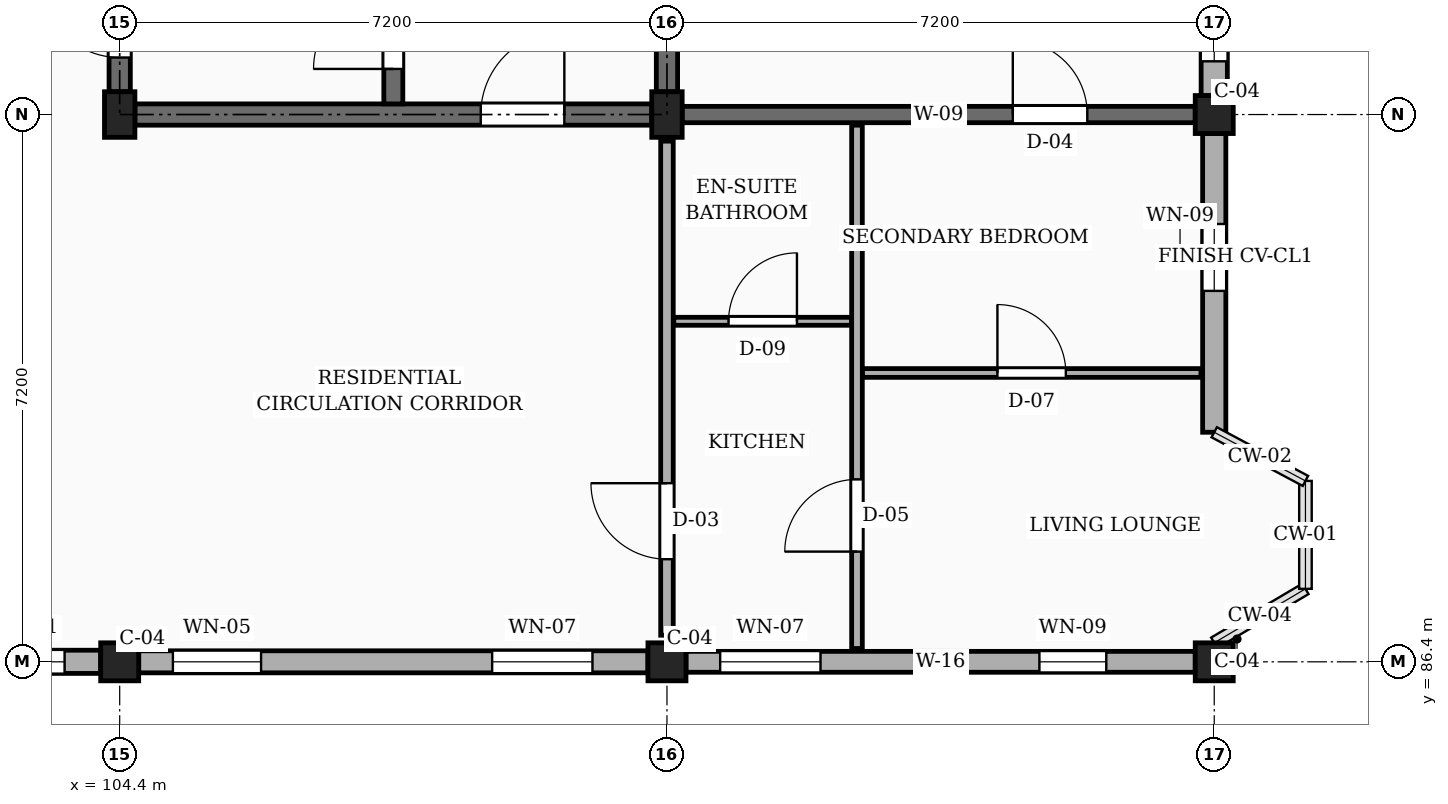
"""IFC4 building model, lengths in metres.
Left out: names, types, materials, properties, quantities, classifications, styles, units other than length and angle.
Written with IfcOpenShell. Run it as: python <this file> out.ifc"""

import sys

from ifc_helpers import new_model, si_unit, direction, frame, frame_2d, origin, origin_2d, place, context, subcontext, project, spatial, rectangle, extrude, element, fill, save


model = new_model("IFC4")
c1 = context("Model", 3, precision=1e-05, world=origin(), true_north=direction((0.0, 1.0)))
c2 = subcontext(c1, "Body", "Model", "MODEL_VIEW")
j1 = project(units=[si_unit("LENGTHUNIT", "METRE"), si_unit("PLANEANGLEUNIT", "RADIAN")], contexts=[c1])
p1 = place(None, origin())
s1 = spatial("IfcSite", under=j1, at=p1, CompositionType="ELEMENT")
p2 = place(p1, origin())
s2 = spatial("IfcBuilding", under=s1, at=p2, CompositionType="ELEMENT")
p3 = place(p2, frame((0.0, 0.0, 29.7)))
s3 = spatial("IfcBuildingStorey", under=s2, at=p3, CompositionType="ELEMENT", Elevation=29.7)
p4 = place(p3, frame((104.4, 86.4, 0.0), z_axis=(0.0, 0.0, 1.0), x_axis=(1.0, 0.0, 0.0)))
e1 = element("IfcColumn", 1, at=p4, inside=s3, PredefinedType="COLUMN", context=c2, shape_type="SweptSolid", body=[
    extrude(rectangle(XDim=0.5, YDim=0.5, at=origin_2d()), origin(), (0.0, 0.0, 1.0), 3.15),
])
p5 = place(p3, frame((104.4, 93.6, 0.0), z_axis=(0.0, 0.0, 1.0), x_axis=(1.0, 0.0, 0.0)))
e2 = element("IfcColumn", 2, at=p5, inside=s3, PredefinedType="COLUMN", context=c2, shape_type="SweptSolid", body=[
    extrude(rectangle(XDim=0.4, YDim=0.6, at=origin_2d()), origin(), (0.0, 0.0, 1.0), 3.15),
])
p6 = place(p3, frame((111.6, 86.4, 0.0), z_axis=(0.0, 0.0, 1.0), x_axis=(1.0, 0.0, 0.0)))
e3 = element("IfcColumn", 3, at=p6, inside=s3, PredefinedType="COLUMN", context=c2, shape_type="SweptSolid", body=[
    extrude(rectangle(XDim=0.5, YDim=0.5, at=origin_2d()), origin(), (0.0, 0.0, 1.0), 3.15),
])
p7 = place(p3, frame((111.6, 93.6, 0.0), z_axis=(0.0, 0.0, 1.0), x_axis=(1.0, 0.0, 0.0)))
e4 = element("IfcColumn", 4, at=p7, inside=s3, PredefinedType="COLUMN", context=c2, shape_type="SweptSolid", body=[
    extrude(rectangle(XDim=0.4, YDim=0.6, at=origin_2d()), origin(), (0.0, 0.0, 1.0), 3.15),
])
for number, where, z_axis, x_axis in (
    (5, (118.8, 86.4, 0.0), (0.0, 0.0, 1.0), (1.0, 0.0, 0.0)),
    (6, (118.8, 93.6, 0.0), (0.0, 0.0, 1.0), (1.0, 0.0, 0.0)),
):
    element("IfcColumn", number, at=place(p3, frame(where, z_axis=z_axis, x_axis=x_axis)), inside=s3, PredefinedType="COLUMN", context=c2, shape_type="SweptSolid", body=[
        extrude(rectangle(XDim=0.5, YDim=0.5, at=origin_2d()), origin(), (0.0, 0.0, 1.0), 3.15),
    ])
p8 = place(p3, frame((111.8, 93.6, 0.0), z_axis=(0.0, 0.0, 1.0), x_axis=(1.0, 0.0, 0.0)))
e7 = element("IfcWall", 7, at=p8, inside=s3, PredefinedType="SOLIDWALL", context=c2, shape_type="SweptSolid", body=[
    extrude(rectangle(XDim=6.75, YDim=0.215, at=frame_2d((3.375, 0.0))), origin(), (0.0, 0.0, 1.0), 2.19),
])
p9 = place(p8, frame((4.35, 0.0, 0.0)))
e8 = element("IfcOpeningElement", 8, at=p9, cuts=e7, PredefinedType="OPENING", context=c2, shape_type="SweptSolid", body=[
    extrude(rectangle(XDim=0.98, YDim=2.12, at=frame_2d((0.49, 1.06))), frame((0.0, 0.118, 0.0), z_axis=(0.0, -1.0, 0.0), x_axis=(1.0, 0.0, 0.0)), (0.0, 0.0, 1.0), 0.235),
])
p10 = place(p3, frame((97.45, 86.4, 0.0), z_axis=(0.0, 0.0, 1.0), x_axis=(1.0, 0.0, 0.0)))
e9 = element("IfcWall", 9, at=p10, inside=s3, PredefinedType="SOLIDWALL", context=c2, shape_type="SweptSolid", body=[
    extrude(rectangle(XDim=6.7, YDim=0.305, at=frame_2d((3.35, 0.0))), origin(), (0.0, 0.0, 1.0), 2.46),
])
p11 = place(p10, frame((1.045, 0.0, 0.78)))
e10 = element("IfcOpeningElement", 10, at=p11, cuts=e9, PredefinedType="OPENING", context=c2, shape_type="SweptSolid", body=[
    extrude(rectangle(XDim=0.92, YDim=1.15, at=frame_2d((0.46, 0.575))), frame((0.0, 0.163, 0.0), z_axis=(0.0, -1.0, 0.0), x_axis=(1.0, 0.0, 0.0)), (0.0, 0.0, 1.0), 0.325),
])
p12 = place(p10, frame((3.32, 0.0, 0.78)))
e11 = element("IfcOpeningElement", 11, at=p12, cuts=e9, PredefinedType="OPENING", context=c2, shape_type="SweptSolid", body=[
    extrude(rectangle(XDim=1.08, YDim=1.15, at=frame_2d((0.54, 0.575))), frame((0.0, 0.163, 0.0), z_axis=(0.0, -1.0, 0.0), x_axis=(1.0, 0.0, 0.0)), (0.0, 0.0, 1.0), 0.325),
])
p13 = place(p10, frame((5.185, 0.0, 0.78)))
e12 = element("IfcOpeningElement", 12, at=p13, cuts=e9, PredefinedType="OPENING", context=c2, shape_type="SweptSolid", body=[
    extrude(rectangle(XDim=1.04, YDim=1.26, at=frame_2d((0.52, 0.63))), frame((0.0, 0.163, 0.0), z_axis=(0.0, -1.0, 0.0), x_axis=(1.0, 0.0, 0.0)), (0.0, 0.0, 1.0), 0.325),
])
p14 = place(p3, frame((104.65, 86.4, 0.0), z_axis=(0.0, 0.0, 1.0), x_axis=(1.0, 0.0, 0.0)))
e13 = element("IfcWall", 13, at=p14, inside=s3, PredefinedType="SOLIDWALL", context=c2, shape_type="SweptSolid", body=[
    extrude(rectangle(XDim=6.7, YDim=0.29, at=frame_2d((3.35, 0.0))), origin(), (0.0, 0.0, 1.0), 2.46),
])
p15 = place(p14, frame((0.45, 0.0, 0.78)))
e14 = element("IfcOpeningElement", 14, at=p15, cuts=e13, PredefinedType="OPENING", context=c2, shape_type="SweptSolid", body=[
    extrude(rectangle(XDim=1.16, YDim=1.15, at=frame_2d((0.58, 0.575))), frame((0.0, 0.155, 0.0), z_axis=(0.0, -1.0, 0.0), x_axis=(1.0, 0.0, 0.0)), (0.0, 0.0, 1.0), 0.31),
])
p16 = place(p14, frame((4.65, 0.0, 0.78)))
e15 = element("IfcOpeningElement", 15, at=p16, cuts=e13, PredefinedType="OPENING", context=c2, shape_type="SweptSolid", body=[
    extrude(rectangle(XDim=1.32, YDim=1.15, at=frame_2d((0.66, 0.575))), frame((0.0, 0.155, 0.0), z_axis=(0.0, -1.0, 0.0), x_axis=(1.0, 0.0, 0.0)), (0.0, 0.0, 1.0), 0.31),
])
p17 = place(p3, frame((111.85, 86.4, 0.0), z_axis=(0.0, 0.0, 1.0), x_axis=(1.0, 0.0, 0.0)))
e16 = element("IfcWall", 16, at=p17, inside=s3, PredefinedType="SOLIDWALL", context=c2, shape_type="SweptSolid", body=[
    extrude(rectangle(XDim=6.7, YDim=0.275, at=frame_2d((3.35, 0.0))), origin(), (0.0, 0.0, 1.0), 2.46),
])
p18 = place(p17, frame((0.45, 0.0, 0.78)))
e17 = element("IfcOpeningElement", 17, at=p18, cuts=e16, PredefinedType="OPENING", context=c2, shape_type="SweptSolid", body=[
    extrude(rectangle(XDim=1.32, YDim=1.15, at=frame_2d((0.66, 0.575))), frame((0.0, 0.147, 0.0), z_axis=(0.0, -1.0, 0.0), x_axis=(1.0, 0.0, 0.0)), (0.0, 0.0, 1.0), 0.295),
])
p19 = place(p17, frame((4.65, 0.0, 0.78)))
e18 = element("IfcOpeningElement", 18, at=p19, cuts=e16, PredefinedType="OPENING", context=c2, shape_type="SweptSolid", body=[
    extrude(rectangle(XDim=0.88, YDim=1.26, at=frame_2d((0.44, 0.63))), frame((0.0, 0.147, 0.0), z_axis=(0.0, -1.0, 0.0), x_axis=(1.0, 0.0, 0.0)), (0.0, 0.0, 1.0), 0.295),
])
p20 = place(p3, frame((118.8, 89.42, 0.0), z_axis=(0.0, 0.0, 1.0), x_axis=(0.0, 1.0, 0.0)))
e19 = element("IfcWall", 19, at=p20, inside=s3, PredefinedType="SOLIDWALL", context=c2, shape_type="SweptSolid", body=[
    extrude(rectangle(XDim=3.93, YDim=0.305, at=frame_2d((1.965, 0.0))), origin(), (0.0, 0.0, 1.0), 2.46),
])
p21 = place(p20, frame((1.86, 0.0, 0.78)))
e20 = element("IfcOpeningElement", 20, at=p21, cuts=e19, PredefinedType="OPENING", context=c2, shape_type="SweptSolid", body=[
    extrude(rectangle(XDim=0.88, YDim=1.26, at=frame_2d((0.44, 0.63))), frame((0.0, 0.163, 0.0), z_axis=(0.0, -1.0, 0.0), x_axis=(1.0, 0.0, 0.0)), (0.0, 0.0, 1.0), 0.325),
])
p22 = place(p3, frame((118.8, 93.85, 0.0), z_axis=(0.0, 0.0, 1.0), x_axis=(0.0, 1.0, 0.0)))
e21 = element("IfcWall", 21, at=p22, inside=s3, PredefinedType="SOLIDWALL", context=c2, shape_type="SweptSolid", body=[
    extrude(rectangle(XDim=6.7, YDim=0.345, at=frame_2d((3.35, 0.0))), origin(), (0.0, 0.0, 1.0), 2.46),
])
p23 = place(p22, frame((0.45, 0.0, 0.78)))
e22 = element("IfcOpeningElement", 22, at=p23, cuts=e21, PredefinedType="OPENING", context=c2, shape_type="SweptSolid", body=[
    extrude(rectangle(XDim=0.96, YDim=1.26, at=frame_2d((0.48, 0.63))), frame((0.0, 0.183, 0.0), z_axis=(0.0, -1.0, 0.0), x_axis=(1.0, 0.0, 0.0)), (0.0, 0.0, 1.0), 0.365),
])
p24 = place(p22, frame((4.65, 0.0, 0.78)))
e23 = element("IfcOpeningElement", 23, at=p24, cuts=e21, PredefinedType="OPENING", context=c2, shape_type="SweptSolid", body=[
    extrude(rectangle(XDim=1.12, YDim=1.26, at=frame_2d((0.56, 0.63))), frame((0.0, 0.183, 0.0), z_axis=(0.0, -1.0, 0.0), x_axis=(1.0, 0.0, 0.0)), (0.0, 0.0, 1.0), 0.365),
])
p25 = place(p3, frame((104.4, 93.9, 0.0), z_axis=(0.0, 0.0, 1.0), x_axis=(0.0, 1.0, 0.0)))
e24 = element("IfcWall", 24, at=p25, inside=s3, PredefinedType="SHEAR", context=c2, shape_type="SweptSolid", body=[
    extrude(rectangle(XDim=6.6, YDim=0.28, at=frame_2d((3.3, 0.0))), origin(), (0.0, 0.0, 1.0), 2.89),
])
p26 = place(p25, frame((0.45, 0.0, 0.0)))
e25 = element("IfcOpeningElement", 25, at=p26, cuts=e24, PredefinedType="OPENING", context=c2, shape_type="SweptSolid", body=[
    extrude(rectangle(XDim=1.05, YDim=2.15, at=frame_2d((0.525, 1.075))), frame((0.0, 0.15, 0.0), z_axis=(0.0, -1.0, 0.0), x_axis=(1.0, 0.0, 0.0)), (0.0, 0.0, 1.0), 0.3),
])
p27 = place(p3, frame((111.6, 93.9, 0.0), z_axis=(0.0, 0.0, 1.0), x_axis=(0.0, 1.0, 0.0)))
e26 = element("IfcWall", 26, at=p27, inside=s3, PredefinedType="SHEAR", context=c2, shape_type="SweptSolid", body=[
    extrude(rectangle(XDim=6.6, YDim=0.28, at=frame_2d((3.3, 0.0))), origin(), (0.0, 0.0, 1.0), 2.89),
])
p28 = place(p3, frame((104.6, 93.6, 0.0), z_axis=(0.0, 0.0, 1.0), x_axis=(1.0, 0.0, 0.0)))
e27 = element("IfcWall", 27, at=p28, inside=s3, PredefinedType="SHEAR", context=c2, shape_type="SweptSolid", body=[
    extrude(rectangle(XDim=6.8, YDim=0.28, at=frame_2d((3.4, 0.0))), origin(), (0.0, 0.0, 1.0), 2.89),
])
p29 = place(p28, frame((4.55, 0.0, 0.0)))
e28 = element("IfcOpeningElement", 28, at=p29, cuts=e27, PredefinedType="OPENING", context=c2, shape_type="SweptSolid", body=[
    extrude(rectangle(XDim=1.1, YDim=2.15, at=frame_2d((0.55, 1.075))), frame((0.0, 0.15, 0.0), z_axis=(0.0, -1.0, 0.0), x_axis=(1.0, 0.0, 0.0)), (0.0, 0.0, 1.0), 0.3),
])
p30 = place(p3, frame((108.0, 93.74, 0.0), z_axis=(0.0, 0.0, 1.0), x_axis=(0.0, 1.0, 0.0)))
e29 = element("IfcWall", 29, at=p30, inside=s3, PredefinedType="SHEAR", context=c2, shape_type="SweptSolid", body=[
    extrude(rectangle(XDim=6.92, YDim=0.25, at=frame_2d((3.46, 0.0))), origin(), (0.0, 0.0, 1.0), 2.89),
])
p31 = place(p30, frame((0.46, 0.0, 0.0)))
e30 = element("IfcOpeningElement", 30, at=p31, cuts=e29, PredefinedType="OPENING", context=c2, shape_type="SweptSolid", body=[
    extrude(rectangle(XDim=1.05, YDim=2.15, at=frame_2d((0.525, 1.075))), frame((0.0, 0.135, 0.0), z_axis=(0.0, -1.0, 0.0), x_axis=(1.0, 0.0, 0.0)), (0.0, 0.0, 1.0), 0.27),
])
p32 = place(p3, frame((111.6, 86.75, 0.0), z_axis=(0.0, 0.0, 1.0), x_axis=(0.0, 1.0, 0.0)))
e31 = element("IfcWall", 31, at=p32, inside=s3, PredefinedType="PARTITIONING", context=c2, shape_type="SweptSolid", body=[
    extrude(rectangle(XDim=6.5, YDim=0.165, at=frame_2d((3.25, 0.0))), origin(), (0.0, 0.0, 1.0), 2.325),
])
p33 = place(p32, frame((1.0, 0.0, 0.0)))
e32 = element("IfcOpeningElement", 32, at=p33, cuts=e31, PredefinedType="OPENING", context=c2, shape_type="SweptSolid", body=[
    extrude(rectangle(XDim=1.0, YDim=2.15, at=frame_2d((0.5, 1.075))), frame((0.0, 0.093, 0.0), z_axis=(0.0, -1.0, 0.0), x_axis=(1.0, 0.0, 0.0)), (0.0, 0.0, 1.0), 0.185),
])
p34 = place(p3, frame((114.17, 90.2, 0.0), z_axis=(0.0, 0.0, 1.0), x_axis=(1.0, 0.0, 0.0)))
e33 = element("IfcWall", 33, at=p34, inside=s3, PredefinedType="PARTITIONING", context=c2, shape_type="SweptSolid", body=[
    extrude(rectangle(XDim=4.455, YDim=0.115, at=frame_2d((2.228, 0.0))), origin(), (0.0, 0.0, 1.0), 2.325),
])
p35 = place(p34, frame((1.778, 0.0, 0.0)))
e34 = element("IfcOpeningElement", 34, at=p35, cuts=e33, PredefinedType="OPENING", context=c2, shape_type="SweptSolid", body=[
    extrude(rectangle(XDim=0.9, YDim=2.1, at=frame_2d((0.45, 1.05))), frame((0.0, 0.067, 0.0), z_axis=(0.0, -1.0, 0.0), x_axis=(1.0, 0.0, 0.0)), (0.0, 0.0, 1.0), 0.135),
])
p36 = place(p3, frame((111.69, 90.88, 0.0), z_axis=(0.0, 0.0, 1.0), x_axis=(1.0, 0.0, 0.0)))
e35 = element("IfcWall", 35, at=p36, inside=s3, PredefinedType="PARTITIONING", context=c2, shape_type="SweptSolid", body=[
    extrude(rectangle(XDim=2.34, YDim=0.105, at=frame_2d((1.17, 0.0))), origin(), (0.0, 0.0, 1.0), 2.325),
])
p37 = place(p36, frame((0.72, 0.0, 0.0)))
e36 = element("IfcOpeningElement", 36, at=p37, cuts=e35, PredefinedType="OPENING", context=c2, shape_type="SweptSolid", body=[
    extrude(rectangle(XDim=0.9, YDim=2.05, at=frame_2d((0.45, 1.025))), frame((0.0, 0.062, 0.0), z_axis=(0.0, -1.0, 0.0), x_axis=(1.0, 0.0, 0.0)), (0.0, 0.0, 1.0), 0.125),
])
p38 = place(p3, frame((114.1, 86.575, 0.0), z_axis=(0.0, 0.0, 1.0), x_axis=(0.0, 1.0, 0.0)))
e37 = element("IfcWall", 37, at=p38, inside=s3, PredefinedType="PARTITIONING", context=c2, shape_type="SweptSolid", body=[
    extrude(rectangle(XDim=6.885, YDim=0.14, at=frame_2d((3.442, 0.0))), origin(), (0.0, 0.0, 1.0), 2.325),
])
p39 = place(p38, frame((1.275, 0.0, 0.0)))
e38 = element("IfcOpeningElement", 38, at=p39, cuts=e37, PredefinedType="OPENING", context=c2, shape_type="SweptSolid", body=[
    extrude(rectangle(XDim=0.95, YDim=2.1, at=frame_2d((0.475, 1.05))), frame((0.0, 0.08, 0.0), z_axis=(0.0, -1.0, 0.0), x_axis=(1.0, 0.0, 0.0)), (0.0, 0.0, 1.0), 0.16),
])
p40 = place(p13, origin())
e39 = element("IfcWindow", 39, at=p40, inside=s3, PartitioningType="SINGLE_PANEL", PredefinedType="WINDOW", context=c2, shape_type="SweptSolid", body=[
    extrude(rectangle(XDim=1.04, YDim=1.26, at=frame_2d((0.52, 0.63))), frame((0.0, 0.03, 0.0), z_axis=(0.0, -1.0, 0.0), x_axis=(1.0, 0.0, 0.0)), (0.0, 0.0, 1.0), 0.06),
])
fill(e12, e39)
p41 = place(p15, origin())
e40 = element("IfcWindow", 40, at=p41, inside=s3, PartitioningType="SINGLE_PANEL", PredefinedType="WINDOW", context=c2, shape_type="SweptSolid", body=[
    extrude(rectangle(XDim=1.16, YDim=1.15, at=frame_2d((0.58, 0.575))), frame((0.0, 0.03, 0.0), z_axis=(0.0, -1.0, 0.0), x_axis=(1.0, 0.0, 0.0)), (0.0, 0.0, 1.0), 0.06),
])
fill(e14, e40)
p42 = place(p16, origin())
e41 = element("IfcWindow", 41, at=p42, inside=s3, PartitioningType="SINGLE_PANEL", PredefinedType="WINDOW", context=c2, shape_type="SweptSolid", body=[
    extrude(rectangle(XDim=1.32, YDim=1.15, at=frame_2d((0.66, 0.575))), frame((0.0, 0.03, 0.0), z_axis=(0.0, -1.0, 0.0), x_axis=(1.0, 0.0, 0.0)), (0.0, 0.0, 1.0), 0.06),
])
fill(e15, e41)
p43 = place(p18, origin())
e42 = element("IfcWindow", 42, at=p43, inside=s3, PartitioningType="SINGLE_PANEL", PredefinedType="WINDOW", context=c2, shape_type="SweptSolid", body=[
    extrude(rectangle(XDim=1.32, YDim=1.15, at=frame_2d((0.66, 0.575))), frame((0.0, 0.03, 0.0), z_axis=(0.0, -1.0, 0.0), x_axis=(1.0, 0.0, 0.0)), (0.0, 0.0, 1.0), 0.06),
])
fill(e17, e42)
p44 = place(p19, origin())
e43 = element("IfcWindow", 43, at=p44, inside=s3, PartitioningType="SINGLE_PANEL", PredefinedType="WINDOW", context=c2, shape_type="SweptSolid", body=[
    extrude(rectangle(XDim=0.88, YDim=1.26, at=frame_2d((0.44, 0.63))), frame((0.0, 0.03, 0.0), z_axis=(0.0, -1.0, 0.0), x_axis=(1.0, 0.0, 0.0)), (0.0, 0.0, 1.0), 0.06),
])
fill(e18, e43)
p45 = place(p21, origin())
e44 = element("IfcWindow", 44, at=p45, inside=s3, PartitioningType="SINGLE_PANEL", PredefinedType="WINDOW", context=c2, shape_type="SweptSolid", body=[
    extrude(rectangle(XDim=0.88, YDim=1.26, at=frame_2d((0.44, 0.63))), frame((0.0, 0.03, 0.0), z_axis=(0.0, -1.0, 0.0), x_axis=(1.0, 0.0, 0.0)), (0.0, 0.0, 1.0), 0.06),
])
fill(e20, e44)
p46 = place(p23, origin())
e45 = element("IfcWindow", 45, at=p46, inside=s3, PartitioningType="SINGLE_PANEL", PredefinedType="WINDOW", context=c2, shape_type="SweptSolid", body=[
    extrude(rectangle(XDim=0.96, YDim=1.26, at=frame_2d((0.48, 0.63))), frame((0.0, 0.03, 0.0), z_axis=(0.0, -1.0, 0.0), x_axis=(1.0, 0.0, 0.0)), (0.0, 0.0, 1.0), 0.06),
])
fill(e22, e45)
p47 = place(p26, origin())
e46 = element("IfcDoor", 46, at=p47, inside=s3, OperationType="SINGLE_SWING_RIGHT", PredefinedType="DOOR", context=c2, shape_type="SweptSolid", body=[
    extrude(rectangle(XDim=1.05, YDim=2.15, at=frame_2d((0.525, 1.075))), frame((0.0, 0.025, 0.0), z_axis=(0.0, -1.0, 0.0), x_axis=(1.0, 0.0, 0.0)), (0.0, 0.0, 1.0), 0.05),
])
fill(e25, e46)
p48 = place(p29, frame((1.1, 0.0, 0.0), z_axis=(0.0, 0.0, 1.0), x_axis=(-1.0, 0.0, 0.0)))
e47 = element("IfcDoor", 47, at=p48, inside=s3, OperationType="SINGLE_SWING_RIGHT", PredefinedType="DOOR", context=c2, shape_type="SweptSolid", body=[
    extrude(rectangle(XDim=1.1, YDim=2.15, at=frame_2d((0.55, 1.075))), frame((0.0, 0.025, 0.0), z_axis=(0.0, -1.0, 0.0), x_axis=(1.0, 0.0, 0.0)), (0.0, 0.0, 1.0), 0.05),
])
fill(e28, e47)
p49 = place(p31, origin())
e48 = element("IfcDoor", 48, at=p49, inside=s3, OperationType="SINGLE_SWING_LEFT", PredefinedType="DOOR", context=c2, shape_type="SweptSolid", body=[
    extrude(rectangle(XDim=1.05, YDim=2.15, at=frame_2d((0.525, 1.075))), frame((0.0, 0.025, 0.0), z_axis=(0.0, -1.0, 0.0), x_axis=(1.0, 0.0, 0.0)), (0.0, 0.0, 1.0), 0.05),
])
fill(e30, e48)
p50 = place(p33, origin())
e49 = element("IfcDoor", 49, at=p50, inside=s3, OperationType="SINGLE_SWING_RIGHT", PredefinedType="DOOR", context=c2, shape_type="SweptSolid", body=[
    extrude(rectangle(XDim=1.0, YDim=2.15, at=frame_2d((0.5, 1.075))), frame((0.0, 0.025, 0.0), z_axis=(0.0, -1.0, 0.0), x_axis=(1.0, 0.0, 0.0)), (0.0, 0.0, 1.0), 0.05),
])
fill(e32, e49)
p51 = place(p35, origin())
e50 = element("IfcDoor", 50, at=p51, inside=s3, OperationType="SINGLE_SWING_LEFT", PredefinedType="DOOR", context=c2, shape_type="SweptSolid", body=[
    extrude(rectangle(XDim=0.9, YDim=2.1, at=frame_2d((0.45, 1.05))), frame((0.0, 0.025, 0.0), z_axis=(0.0, -1.0, 0.0), x_axis=(1.0, 0.0, 0.0)), (0.0, 0.0, 1.0), 0.05),
])
fill(e34, e50)
p52 = place(p37, origin())
e51 = element("IfcDoor", 51, at=p52, inside=s3, OperationType="SINGLE_SWING_RIGHT", PredefinedType="DOOR", context=c2, shape_type="SweptSolid", body=[
    extrude(rectangle(XDim=0.9, YDim=2.05, at=frame_2d((0.45, 1.025))), frame((0.0, 0.025, 0.0), z_axis=(0.0, -1.0, 0.0), x_axis=(1.0, 0.0, 0.0)), (0.0, 0.0, 1.0), 0.05),
])
fill(e36, e51)
p53 = place(p39, origin())
e52 = element("IfcDoor", 52, at=p53, inside=s3, OperationType="SINGLE_SWING_LEFT", PredefinedType="DOOR", context=c2, shape_type="SweptSolid", body=[
    extrude(rectangle(XDim=0.95, YDim=2.1, at=frame_2d((0.475, 1.05))), frame((0.0, 0.025, 0.0), z_axis=(0.0, -1.0, 0.0), x_axis=(1.0, 0.0, 0.0)), (0.0, 0.0, 1.0), 0.05),
])
fill(e38, e52)
p54 = place(p9, origin())
e53 = element("IfcDoor", 53, at=p54, inside=s3, OperationType="SINGLE_SWING_LEFT", PredefinedType="DOOR", context=c2, shape_type="SweptSolid", body=[
    extrude(rectangle(XDim=0.98, YDim=2.12, at=frame_2d((0.49, 1.06))), frame((0.0, 0.025, 0.0), z_axis=(0.0, -1.0, 0.0), x_axis=(1.0, 0.0, 0.0)), (0.0, 0.0, 1.0), 0.05),
])
fill(e8, e53)
save(model, sys.argv[1])
